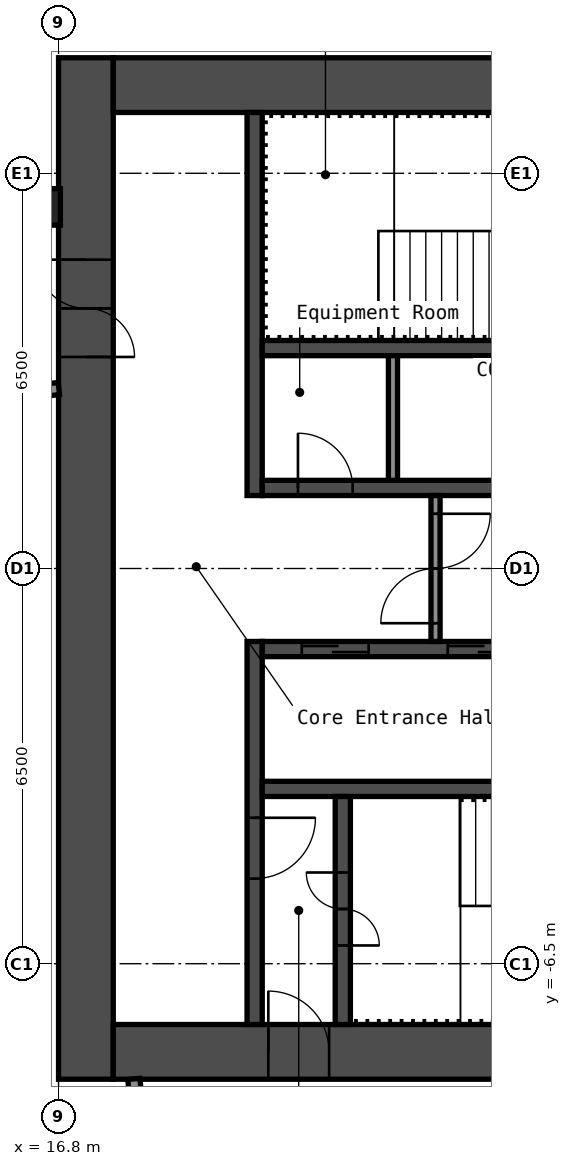
"""IFC4 building model, lengths in metres.
Left out: names, types, materials, properties, quantities, classifications, styles, units other than length and angle.
Written with IfcOpenShell. Run it as: python <this file> out.ifc"""

import sys

from ifc_helpers import new_model, si_unit, direction, frame, frame_2d, origin, origin_2d, place, context, subcontext, project, spatial, rectangle, hollow_rectangle, extrude, element, fill, save


model = new_model("IFC4")
c1 = context("Model", 3, precision=1e-05, world=origin(), true_north=direction((0.0, 1.0)))
c2 = subcontext(c1, "Body", "Model", "MODEL_VIEW")
j1 = project(units=[si_unit("LENGTHUNIT", "METRE"), si_unit("PLANEANGLEUNIT", "RADIAN")], contexts=[c1])
p1 = place(None, origin())
s1 = spatial("IfcSite", under=j1, at=p1, CompositionType="ELEMENT")
p2 = place(p1, origin())
s2 = spatial("IfcBuilding", under=s1, at=p2, CompositionType="ELEMENT")
p3 = place(p2, frame((0.0, 0.0, 251.8)))
s3 = spatial("IfcBuildingStorey", under=s2, at=p3, CompositionType="ELEMENT", Elevation=251.8)
p4 = place(p3, frame((16.53, 5.947, 0.0), z_axis=(0.0, 0.0, 1.0), x_axis=(1.0, 0.0, 0.0)))
e1 = element("IfcColumn", 1, at=p4, inside=s3, PredefinedType="COLUMN", context=c2, shape_type="SweptSolid", body=[
    extrude(hollow_rectangle(XDim=0.6, YDim=0.6, WallThickness=0.025, InnerFilletRadius=0.038, OuterFilletRadius=0.062, at=origin_2d()), origin(), (0.0, 0.0, 1.0), 2.75),
])
p5 = place(p3, frame((17.25, -8.4, 0.0), z_axis=(0.0, 0.0, 1.0), x_axis=(0.0, 1.0, 0.0)))
e2 = element("IfcWall", 2, at=p5, inside=s3, PredefinedType="SHEAR", context=c2, shape_type="SweptSolid", body=[
    extrude(rectangle(XDim=16.8, YDim=0.9, at=frame_2d((8.4, 0.0))), origin(), (0.0, 0.0, 1.0), 2.75),
])
p6 = place(p5, frame((11.879, 0.0, 0.0)))
e3 = element("IfcOpeningElement", 3, at=p6, cuts=e2, PredefinedType="OPENING", context=c2, shape_type="SweptSolid", body=[
    extrude(rectangle(XDim=1.6, YDim=2.1, at=frame_2d((0.8, 1.05))), frame((0.0, 0.46, 0.0), z_axis=(0.0, -1.0, 0.0), x_axis=(1.0, 0.0, 0.0)), (0.0, 0.0, 1.0), 0.92),
])
p7 = place(p3, frame((17.7, 7.95, 0.0), z_axis=(0.0, 0.0, 1.0), x_axis=(1.0, 0.0, 0.0)))
e4 = element("IfcWall", 4, at=p7, inside=s3, PredefinedType="SHEAR", context=c2, shape_type="SweptSolid", body=[
    extrude(rectangle(XDim=15.0, YDim=0.9, at=frame_2d((7.5, 0.0))), origin(), (0.0, 0.0, 1.0), 2.75),
])
p8 = place(p7, frame((10.4, 0.0, 0.0)))
e5 = element("IfcOpeningElement", 5, at=p8, cuts=e4, PredefinedType="OPENING", context=c2, shape_type="SweptSolid", body=[
    extrude(rectangle(XDim=1.2, YDim=2.1, at=frame_2d((0.6, 1.05))), frame((0.0, 0.46, 0.0), z_axis=(0.0, -1.0, 0.0), x_axis=(1.0, 0.0, 0.0)), (0.0, 0.0, 1.0), 0.92),
])
p9 = place(p7, frame((13.35, 0.0, 0.0)))
e6 = element("IfcOpeningElement", 6, at=p9, cuts=e4, PredefinedType="OPENING", context=c2, shape_type="SweptSolid", body=[
    extrude(rectangle(XDim=0.9, YDim=2.1, at=frame_2d((0.45, 1.05))), frame((0.0, 0.46, 0.0), z_axis=(0.0, -1.0, 0.0), x_axis=(1.0, 0.0, 0.0)), (0.0, 0.0, 1.0), 0.92),
])
p10 = place(p3, frame((17.7, -7.95, 0.0), z_axis=(0.0, 0.0, 1.0), x_axis=(1.0, 0.0, 0.0)))
e7 = element("IfcWall", 7, at=p10, inside=s3, PredefinedType="SHEAR", context=c2, shape_type="SweptSolid", body=[
    extrude(rectangle(XDim=15.0, YDim=0.9, at=frame_2d((7.5, 0.0))), origin(), (0.0, 0.0, 1.0), 2.75),
])
p11 = place(p10, frame((2.55, 0.0, 0.0)))
e8 = element("IfcOpeningElement", 8, at=p11, cuts=e7, PredefinedType="OPENING", context=c2, shape_type="SweptSolid", body=[
    extrude(rectangle(XDim=1.0, YDim=2.1, at=frame_2d((0.5, 1.05))), frame((0.0, 0.46, 0.0), z_axis=(0.0, -1.0, 0.0), x_axis=(1.0, 0.0, 0.0)), (0.0, 0.0, 1.0), 0.92),
])
p12 = place(p3, frame((20.025, 1.2, 0.0), z_axis=(0.0, 0.0, 1.0), x_axis=(0.0, 1.0, 0.0)))
e9 = element("IfcWall", 9, at=p12, inside=s3, PredefinedType="SHEAR", context=c2, shape_type="SweptSolid", body=[
    extrude(rectangle(XDim=6.3, YDim=0.25, at=frame_2d((3.15, 0.0))), origin(), (0.0, 0.0, 1.0), 2.75),
])
p13 = place(p3, frame((20.025, -7.5, 0.0), z_axis=(0.0, 0.0, 1.0), x_axis=(0.0, 1.0, 0.0)))
e10 = element("IfcWall", 10, at=p13, inside=s3, PredefinedType="SHEAR", context=c2, shape_type="SweptSolid", body=[
    extrude(rectangle(XDim=6.3, YDim=0.25, at=frame_2d((3.15, 0.0))), origin(), (0.0, 0.0, 1.0), 2.75),
])
p14 = place(p13, frame((2.4, 0.0, 0.0)))
e11 = element("IfcOpeningElement", 11, at=p14, cuts=e10, PredefinedType="OPENING", context=c2, shape_type="SweptSolid", body=[
    extrude(rectangle(XDim=1.0, YDim=2.1, at=frame_2d((0.5, 1.05))), frame((0.0, 0.135, 0.0), z_axis=(0.0, -1.0, 0.0), x_axis=(1.0, 0.0, 0.0)), (0.0, 0.0, 1.0), 0.27),
])
p15 = place(p3, frame((20.15, 1.325, 0.0), z_axis=(0.0, 0.0, 1.0), x_axis=(1.0, 0.0, 0.0)))
e12 = element("IfcWall", 12, at=p15, inside=s3, PredefinedType="SHEAR", context=c2, shape_type="SweptSolid", body=[
    extrude(rectangle(XDim=7.5, YDim=0.25, at=frame_2d((3.75, 0.0))), origin(), (0.0, 0.0, 1.0), 2.75),
])
p16 = place(p15, frame((0.587, 0.0, 0.0)))
e13 = element("IfcOpeningElement", 13, at=p16, cuts=e12, PredefinedType="OPENING", context=c2, shape_type="SweptSolid", body=[
    extrude(rectangle(XDim=0.9, YDim=2.1, at=frame_2d((0.45, 1.05))), frame((0.0, 0.135, 0.0), z_axis=(0.0, -1.0, 0.0), x_axis=(1.0, 0.0, 0.0)), (0.0, 0.0, 1.0), 0.27),
])
p17 = place(p15, frame((4.288, 0.0, 0.0)))
e14 = element("IfcOpeningElement", 14, at=p17, cuts=e12, PredefinedType="OPENING", context=c2, shape_type="SweptSolid", body=[
    extrude(rectangle(XDim=0.9, YDim=2.1, at=frame_2d((0.45, 1.05))), frame((0.0, 0.135, 0.0), z_axis=(0.0, -1.0, 0.0), x_axis=(1.0, 0.0, 0.0)), (0.0, 0.0, 1.0), 0.27),
])
p18 = place(p3, frame((20.15, 3.625, 0.0), z_axis=(0.0, 0.0, 1.0), x_axis=(1.0, 0.0, 0.0)))
e15 = element("IfcWall", 15, at=p18, inside=s3, PredefinedType="SHEAR", context=c2, shape_type="SweptSolid", body=[
    extrude(rectangle(XDim=7.5, YDim=0.25, at=frame_2d((3.75, 0.0))), origin(), (0.0, 0.0, 1.0), 2.75),
])
p19 = place(p3, frame((20.15, -1.325, 0.0), z_axis=(0.0, 0.0, 1.0), x_axis=(1.0, 0.0, 0.0)))
e16 = element("IfcWall", 16, at=p19, inside=s3, PredefinedType="SHEAR", context=c2, shape_type="SweptSolid", body=[
    extrude(rectangle(XDim=7.5, YDim=0.25, at=frame_2d((3.75, 0.0))), origin(), (0.0, 0.0, 1.0), 2.75),
])
p20 = place(p19, frame((0.65, 0.0, 0.0)))
e17 = element("IfcOpeningElement", 17, at=p20, cuts=e16, PredefinedType="OPENING", context=c2, shape_type="SweptSolid", body=[
    extrude(rectangle(XDim=1.1, YDim=2.1, at=frame_2d((0.55, 1.05))), frame((0.0, 0.135, 0.0), z_axis=(0.0, -1.0, 0.0), x_axis=(1.0, 0.0, 0.0)), (0.0, 0.0, 1.0), 0.27),
])
p21 = place(p19, frame((3.05, 0.0, 0.0)))
e18 = element("IfcOpeningElement", 18, at=p21, cuts=e16, PredefinedType="OPENING", context=c2, shape_type="SweptSolid", body=[
    extrude(rectangle(XDim=1.1, YDim=2.1, at=frame_2d((0.55, 1.05))), frame((0.0, 0.135, 0.0), z_axis=(0.0, -1.0, 0.0), x_axis=(1.0, 0.0, 0.0)), (0.0, 0.0, 1.0), 0.27),
])
p22 = place(p19, frame((5.45, 0.0, 0.0)))
e19 = element("IfcOpeningElement", 19, at=p22, cuts=e16, PredefinedType="OPENING", context=c2, shape_type="SweptSolid", body=[
    extrude(rectangle(XDim=1.1, YDim=2.1, at=frame_2d((0.55, 1.05))), frame((0.0, 0.135, 0.0), z_axis=(0.0, -1.0, 0.0), x_axis=(1.0, 0.0, 0.0)), (0.0, 0.0, 1.0), 0.27),
])
p23 = place(p3, frame((20.15, -3.625, 0.0), z_axis=(0.0, 0.0, 1.0), x_axis=(1.0, 0.0, 0.0)))
e20 = element("IfcWall", 20, at=p23, inside=s3, PredefinedType="SHEAR", context=c2, shape_type="SweptSolid", body=[
    extrude(rectangle(XDim=7.5, YDim=0.25, at=frame_2d((3.75, 0.0))), origin(), (0.0, 0.0, 1.0), 2.75),
])
p24 = place(p3, frame((21.475, -7.5, 0.0), z_axis=(0.0, 0.0, 1.0), x_axis=(0.0, 1.0, 0.0)))
e21 = element("IfcWall", 21, at=p24, inside=s3, PredefinedType="SHEAR", context=c2, shape_type="SweptSolid", body=[
    extrude(rectangle(XDim=3.75, YDim=0.25, at=frame_2d((1.875, 0.0))), origin(), (0.0, 0.0, 1.0), 2.75),
])
p25 = place(p24, frame((1.3, 0.0, 0.0)))
e22 = element("IfcOpeningElement", 22, at=p25, cuts=e21, PredefinedType="OPENING", context=c2, shape_type="SweptSolid", body=[
    extrude(rectangle(XDim=1.2, YDim=2.1, at=frame_2d((0.6, 1.05))), frame((0.0, 0.135, 0.0), z_axis=(0.0, -1.0, 0.0), x_axis=(1.0, 0.0, 0.0)), (0.0, 0.0, 1.0), 0.27),
])
p26 = place(p3, frame((23.0, -1.2, 0.0), z_axis=(0.0, 0.0, 1.0), x_axis=(0.0, 1.0, 0.0)))
e23 = element("IfcWall", 23, at=p26, inside=s3, PredefinedType="PARTITIONING", context=c2, shape_type="SweptSolid", body=[
    extrude(rectangle(XDim=2.4, YDim=0.15, at=frame_2d((1.2, 0.0))), origin(), (0.0, 0.0, 1.0), 2.75),
])
p27 = place(p26, frame((0.3, 0.0, 0.0)))
e24 = element("IfcOpeningElement", 24, at=p27, cuts=e23, PredefinedType="OPENING", context=c2, shape_type="SweptSolid", body=[
    extrude(rectangle(XDim=1.8, YDim=2.1, at=frame_2d((0.9, 1.05))), frame((0.0, 0.085, 0.0), z_axis=(0.0, -1.0, 0.0), x_axis=(1.0, 0.0, 0.0)), (0.0, 0.0, 1.0), 0.17),
])
p28 = place(p3, frame((22.3, 1.45, 0.0), z_axis=(0.0, 0.0, 1.0), x_axis=(0.0, 1.0, 0.0)))
e25 = element("IfcWall", 25, at=p28, inside=s3, PredefinedType="PARTITIONING", context=c2, shape_type="SweptSolid", body=[
    extrude(rectangle(XDim=2.05, YDim=0.15, at=frame_2d((1.025, 0.0))), origin(), (0.0, 0.0, 1.0), 2.75),
])
p29 = place(p3, frame((-16.572, -0.549, 0.0), z_axis=(0.0, 0.0, 1.0), x_axis=(0.994521146831, 0.104535584879, 0.0)))
e26 = element("IfcWall", 26, at=p29, inside=s3, PredefinedType="PARTITIONING", context=c2, shape_type="SweptSolid", body=[
    extrude(rectangle(XDim=33.561, YDim=0.2, at=frame_2d((16.78, 0.0))), origin(), (0.0, 0.0, 1.0), 2.75),
])
p30 = place(p29, frame((3.7, 0.0, 0.0)))
e27 = element("IfcOpeningElement", 27, at=p30, cuts=e26, PredefinedType="OPENING", context=c2, shape_type="SweptSolid", body=[
    extrude(rectangle(XDim=1.0, YDim=2.1, at=frame_2d((0.5, 1.05))), frame((0.0, 0.11, 0.0), z_axis=(0.0, -1.0, 0.0), x_axis=(1.0, 0.0, 0.0)), (0.0, 0.0, 1.0), 0.22),
])
p31 = place(p29, frame((9.715, 0.0, 0.0)))
e28 = element("IfcOpeningElement", 28, at=p31, cuts=e26, PredefinedType="OPENING", context=c2, shape_type="SweptSolid", body=[
    extrude(rectangle(XDim=0.9, YDim=2.1, at=frame_2d((0.45, 1.05))), frame((0.0, 0.11, 0.0), z_axis=(0.0, -1.0, 0.0), x_axis=(1.0, 0.0, 0.0)), (0.0, 0.0, 1.0), 0.22),
])
p32 = place(p29, frame((13.915, 0.0, 0.0)))
e29 = element("IfcOpeningElement", 29, at=p32, cuts=e26, PredefinedType="OPENING", context=c2, shape_type="SweptSolid", body=[
    extrude(rectangle(XDim=0.9, YDim=2.1, at=frame_2d((0.45, 1.05))), frame((0.0, 0.11, 0.0), z_axis=(0.0, -1.0, 0.0), x_axis=(1.0, 0.0, 0.0)), (0.0, 0.0, 1.0), 0.22),
])
p33 = place(p29, frame((18.8, 0.0, 0.0)))
e30 = element("IfcOpeningElement", 30, at=p33, cuts=e26, PredefinedType="OPENING", context=c2, shape_type="SweptSolid", body=[
    extrude(rectangle(XDim=1.0, YDim=2.1, at=frame_2d((0.5, 1.05))), frame((0.0, 0.11, 0.0), z_axis=(0.0, -1.0, 0.0), x_axis=(1.0, 0.0, 0.0)), (0.0, 0.0, 1.0), 0.22),
])
p34 = place(p29, frame((28.9, 0.0, 0.0)))
e31 = element("IfcOpeningElement", 31, at=p34, cuts=e26, PredefinedType="OPENING", context=c2, shape_type="SweptSolid", body=[
    extrude(rectangle(XDim=1.0, YDim=2.1, at=frame_2d((0.5, 1.05))), frame((0.0, 0.11, 0.0), z_axis=(0.0, -1.0, 0.0), x_axis=(1.0, 0.0, 0.0)), (0.0, 0.0, 1.0), 0.22),
])
p35 = place(p3, frame((18.516, -12.949, 0.0), z_axis=(0.0, 0.0, 1.0), x_axis=(-0.104548796268, 0.994519758074, 0.0)))
e32 = element("IfcWall", 32, at=p35, inside=s3, PredefinedType="PARTITIONING", context=c2, shape_type="SweptSolid", body=[
    extrude(rectangle(XDim=4.579, YDim=0.2, at=frame_2d((2.29, 0.0))), origin(), (0.0, 0.0, 1.0), 2.75),
])
p36 = place(p6, origin())
e33 = element("IfcDoor", 33, at=p36, inside=s3, OperationType="DOUBLE_DOOR_SINGLE_SWING", PredefinedType="DOOR", context=c2, shape_type="SweptSolid", body=[
    extrude(rectangle(XDim=1.6, YDim=2.1, at=frame_2d((0.8, 1.05))), frame((0.0, 0.025, 0.0), z_axis=(0.0, -1.0, 0.0), x_axis=(1.0, 0.0, 0.0)), (0.0, 0.0, 1.0), 0.05),
])
fill(e3, e33)
p37 = place(p11, origin())
e34 = element("IfcDoor", 34, at=p37, inside=s3, OperationType="SINGLE_SWING_RIGHT", PredefinedType="DOOR", context=c2, shape_type="SweptSolid", body=[
    extrude(rectangle(XDim=1.0, YDim=2.1, at=frame_2d((0.5, 1.05))), frame((0.0, 0.025, 0.0), z_axis=(0.0, -1.0, 0.0), x_axis=(1.0, 0.0, 0.0)), (0.0, 0.0, 1.0), 0.05),
])
fill(e8, e34)
p38 = place(p25, origin())
e35 = element("IfcDoor", 35, at=p38, inside=s3, OperationType="DOUBLE_DOOR_SINGLE_SWING", PredefinedType="DOOR", context=c2, shape_type="SweptSolid", body=[
    extrude(rectangle(XDim=1.2, YDim=2.1, at=frame_2d((0.6, 1.05))), frame((0.0, 0.025, 0.0), z_axis=(0.0, -1.0, 0.0), x_axis=(1.0, 0.0, 0.0)), (0.0, 0.0, 1.0), 0.05),
])
fill(e22, e35)
p39 = place(p14, origin())
e36 = element("IfcDoor", 36, at=p39, inside=s3, OperationType="SINGLE_SWING_RIGHT", PredefinedType="DOOR", context=c2, shape_type="SweptSolid", body=[
    extrude(rectangle(XDim=1.0, YDim=2.1, at=frame_2d((0.5, 1.05))), frame((0.0, 0.025, 0.0), z_axis=(0.0, -1.0, 0.0), x_axis=(1.0, 0.0, 0.0)), (0.0, 0.0, 1.0), 0.05),
])
fill(e11, e36)
p40 = place(p27, origin())
e37 = element("IfcDoor", 37, at=p40, inside=s3, OperationType="DOUBLE_DOOR_SINGLE_SWING", PredefinedType="DOOR", context=c2, shape_type="SweptSolid", body=[
    extrude(rectangle(XDim=1.8, YDim=2.1, at=frame_2d((0.9, 1.05))), frame((0.0, 0.025, 0.0), z_axis=(0.0, -1.0, 0.0), x_axis=(1.0, 0.0, 0.0)), (0.0, 0.0, 1.0), 0.05),
])
fill(e24, e37)
p41 = place(p16, origin())
e38 = element("IfcDoor", 38, at=p41, inside=s3, OperationType="SINGLE_SWING_RIGHT", PredefinedType="DOOR", context=c2, shape_type="SweptSolid", body=[
    extrude(rectangle(XDim=0.9, YDim=2.1, at=frame_2d((0.45, 1.05))), frame((0.0, 0.025, 0.0), z_axis=(0.0, -1.0, 0.0), x_axis=(1.0, 0.0, 0.0)), (0.0, 0.0, 1.0), 0.05),
])
fill(e13, e38)
p42 = place(p20, origin())
e39 = element("IfcDoor", 39, at=p42, inside=s3, OperationType="DOUBLE_DOOR_SLIDING", PredefinedType="DOOR", context=c2, shape_type="SweptSolid", body=[
    extrude(rectangle(XDim=1.1, YDim=2.1, at=frame_2d((0.55, 1.05))), frame((0.0, 0.025, 0.0), z_axis=(0.0, -1.0, 0.0), x_axis=(1.0, 0.0, 0.0)), (0.0, 0.0, 1.0), 0.05),
])
fill(e17, e39)
p43 = place(p21, origin())
e40 = element("IfcDoor", 40, at=p43, inside=s3, OperationType="DOUBLE_DOOR_SLIDING", PredefinedType="DOOR", context=c2, shape_type="SweptSolid", body=[
    extrude(rectangle(XDim=1.1, YDim=2.1, at=frame_2d((0.55, 1.05))), frame((0.0, 0.025, 0.0), z_axis=(0.0, -1.0, 0.0), x_axis=(1.0, 0.0, 0.0)), (0.0, 0.0, 1.0), 0.05),
])
fill(e18, e40)
save(model, sys.argv[1])
